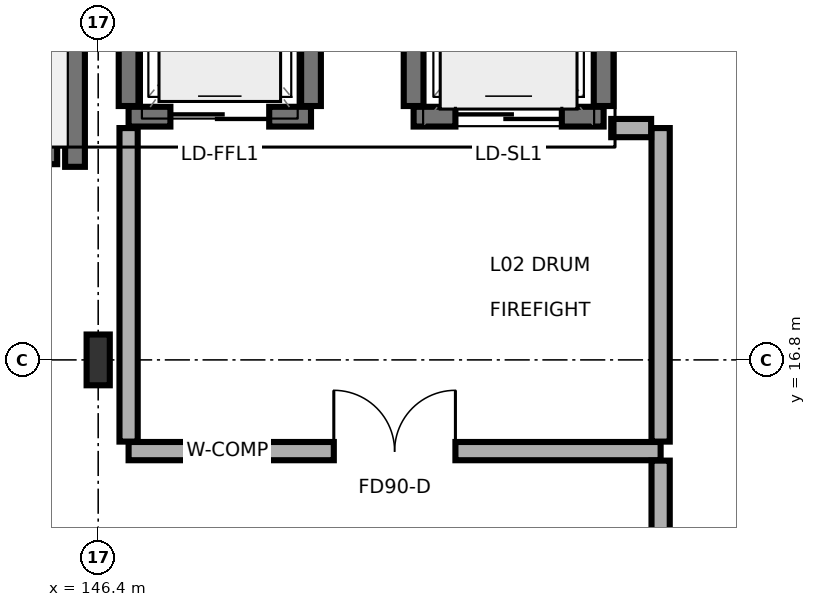
"""IFC4 building model, lengths in metres.
Left out: names, types, materials, properties, quantities, classifications, styles, units other than length and angle.
Written with IfcOpenShell. Run it as: python <this file> out.ifc"""

import sys

from ifc_helpers import new_model, si_unit, direction, frame, frame_2d, origin, origin_2d, place, context, subcontext, project, spatial, rectangle, i_section, extrude, element, fill, save


model = new_model("IFC4")
c1 = context("Model", 3, precision=1e-05, world=origin(), true_north=direction((0.0, 1.0)))
c2 = subcontext(c1, "Body", "Model", "MODEL_VIEW")
j1 = project(units=[si_unit("LENGTHUNIT", "METRE"), si_unit("PLANEANGLEUNIT", "RADIAN")], contexts=[c1])
p1 = place(None, origin())
s1 = spatial("IfcSite", under=j1, at=p1, CompositionType="ELEMENT")
p2 = place(p1, origin())
s2 = spatial("IfcBuilding", under=s1, at=p2, CompositionType="ELEMENT")
p3 = place(p2, frame((0.0, 0.0, 5.4)))
s3 = spatial("IfcBuildingStorey", under=s2, at=p3, CompositionType="ELEMENT", Elevation=5.4)
p4 = place(p3, frame((146.4, 16.8, 0.0), z_axis=(0.0, 0.0, 1.0), x_axis=(1.0, 0.0, 0.0)))
e1 = element("IfcColumn", 1, at=p4, inside=s3, PredefinedType="COLUMN", context=c2, shape_type="SweptSolid", body=[
    extrude(i_section(OverallWidth=0.305, OverallDepth=0.668, WebThickness=0.021, FlangeThickness=0.04, FilletRadius=0.027, at=origin_2d()), origin(), (0.0, 0.0, 1.0), 4.5),
])
p5 = place(p3, frame((146.095, 19.34, 0.0), z_axis=(0.0, 0.0, 1.0), x_axis=(0.0, 1.0, 0.0)))
e2 = element("IfcWall", 2, at=p5, inside=s3, PredefinedType="SHEAR", context=c2, shape_type="SweptSolid", body=[
    extrude(rectangle(XDim=4.27, YDim=0.26, at=frame_2d((2.135, 0.0))), origin(), (0.0, 0.0, 1.0), 4.24),
])
p6 = place(p3, frame((137.34, 19.505, 0.0), z_axis=(0.0, 0.0, 1.0), x_axis=(1.0, 0.0, 0.0)))
e3 = element("IfcWall", 3, at=p6, inside=s3, PredefinedType="SHEAR", context=c2, shape_type="SweptSolid", body=[
    extrude(rectangle(XDim=8.52, YDim=0.26, at=frame_2d((4.26, 0.0))), origin(), (0.0, 0.0, 1.0), 4.24),
])
p7 = place(p3, frame((146.8, 20.0, 0.0), z_axis=(0.0, 0.0, 1.0), x_axis=(1.0, 0.0, 0.0)))
e4 = element("IfcWall", 4, at=p7, inside=s3, PredefinedType="SHEAR", context=c2, shape_type="SweptSolid", body=[
    extrude(rectangle(XDim=2.4, YDim=0.26, at=frame_2d((1.2, 0.0))), origin(), (0.0, 0.0, 1.0), 4.24),
])
p8 = place(p7, frame((0.55, 0.0, 0.0)))
e5 = element("IfcOpeningElement", 5, at=p8, cuts=e4, PredefinedType="OPENING", context=c2, shape_type="SweptSolid", body=[
    extrude(rectangle(XDim=1.3, YDim=2.25, at=frame_2d((0.65, 1.125))), frame((0.0, 0.14, 0.0), z_axis=(0.0, -1.0, 0.0), x_axis=(1.0, 0.0, 0.0)), (0.0, 0.0, 1.0), 0.28),
])
for number, where, z_axis, x_axis in (
    (6, (146.8, 20.14, 0.0), (0.0, 0.0, 1.0), (0.0, 1.0, 0.0)),
    (7, (149.2, 20.14, 0.0), (0.0, 0.0, 1.0), (0.0, 1.0, 0.0)),
):
    element("IfcWall", number, at=place(p3, frame(where, z_axis=z_axis, x_axis=x_axis)), inside=s3, PredefinedType="SHEAR", context=c2, shape_type="SweptSolid", body=[
        extrude(rectangle(XDim=2.52, YDim=0.26, at=frame_2d((1.26, 0.0))), origin(), (0.0, 0.0, 1.0), 4.24),
    ])
p9 = place(p3, frame((150.55, 20.0, 0.0), z_axis=(0.0, 0.0, 1.0), x_axis=(1.0, 0.0, 0.0)))
e8 = element("IfcWall", 8, at=p9, inside=s3, PredefinedType="SHEAR", context=c2, shape_type="SweptSolid", body=[
    extrude(rectangle(XDim=2.5, YDim=0.26, at=frame_2d((1.25, 0.0))), origin(), (0.0, 0.0, 1.0), 4.24),
])
p10 = place(p9, frame((0.55, 0.0, 0.0)))
e9 = element("IfcOpeningElement", 9, at=p10, cuts=e8, PredefinedType="OPENING", context=c2, shape_type="SweptSolid", body=[
    extrude(rectangle(XDim=1.4, YDim=2.3, at=frame_2d((0.7, 1.15))), frame((0.0, 0.14, 0.0), z_axis=(0.0, -1.0, 0.0), x_axis=(1.0, 0.0, 0.0)), (0.0, 0.0, 1.0), 0.28),
])
for number, where, z_axis, x_axis in (
    (10, (150.55, 20.14, 0.0), (0.0, 0.0, 1.0), (0.0, 1.0, 0.0)),
    (11, (153.05, 20.14, 0.0), (0.0, 0.0, 1.0), (0.0, 1.0, 0.0)),
):
    element("IfcWall", number, at=place(p3, frame(where, z_axis=z_axis, x_axis=x_axis)), inside=s3, PredefinedType="SHEAR", context=c2, shape_type="SweptSolid", body=[
        extrude(rectangle(XDim=2.52, YDim=0.26, at=frame_2d((1.26, 0.0))), origin(), (0.0, 0.0, 1.0), 4.24),
    ])
p11 = place(p3, frame((146.8, 15.6, 0.0), z_axis=(0.0, 0.0, 1.0), x_axis=(1.0, 0.0, 0.0)))
e12 = element("IfcWall", 12, at=p11, inside=s3, PredefinedType="SOLIDWALL", context=c2, shape_type="SweptSolid", body=[
    extrude(rectangle(XDim=7.0, YDim=0.24, at=frame_2d((3.5, 0.0))), origin(), (0.0, 0.0, 1.0), 4.24),
])
p12 = place(p11, frame((2.7, 0.0, 0.0)))
e13 = element("IfcOpeningElement", 13, at=p12, cuts=e12, PredefinedType="OPENING", context=c2, shape_type="SweptSolid", body=[
    extrude(rectangle(XDim=1.6, YDim=2.2, at=frame_2d((0.8, 1.1))), frame((0.0, 0.13, 0.0), z_axis=(0.0, -1.0, 0.0), x_axis=(1.0, 0.0, 0.0)), (0.0, 0.0, 1.0), 0.26),
])
for number, where, z_axis, x_axis in (
    (14, (146.8, 15.725, 0.0), (0.0, 0.0, 1.0), (0.0, 1.0, 0.0)),
    (15, (153.8, 15.725, 0.0), (0.0, 0.0, 1.0), (0.0, 1.0, 0.0)),
):
    element("IfcWall", number, at=place(p3, frame(where, z_axis=z_axis, x_axis=x_axis)), inside=s3, PredefinedType="SOLIDWALL", context=c2, shape_type="SweptSolid", body=[
        extrude(rectangle(XDim=4.125, YDim=0.24, at=frame_2d((2.062, 0.0))), origin(), (0.0, 0.0, 1.0), 3.685),
    ])
p13 = place(p3, frame((153.15, 19.85, 0.0), z_axis=(0.0, 0.0, 1.0), x_axis=(1.0, 0.0, 0.0)))
e16 = element("IfcWall", 16, at=p13, inside=s3, PredefinedType="SOLIDWALL", context=c2, shape_type="SweptSolid", body=[
    extrude(rectangle(XDim=0.525, YDim=0.24, at=frame_2d((0.263, 0.0))), origin(), (0.0, 0.0, 1.0), 4.24),
])
p14 = place(p3, frame((153.8, 13.525, 0.0), z_axis=(0.0, 0.0, 1.0), x_axis=(0.0, 1.0, 0.0)))
e17 = element("IfcWall", 17, at=p14, inside=s3, PredefinedType="SOLIDWALL", context=c2, shape_type="SweptSolid", body=[
    extrude(rectangle(XDim=1.95, YDim=0.24, at=frame_2d((0.975, 0.0))), origin(), (0.0, 0.0, 1.0), 4.24),
])
p15 = place(p8, origin())
e18 = element("IfcDoor", 18, at=p15, inside=s3, OperationType="SLIDING_TO_RIGHT", PredefinedType="DOOR", context=c2, shape_type="SweptSolid", body=[
    extrude(rectangle(XDim=1.3, YDim=2.25, at=frame_2d((0.65, 1.125))), frame((0.0, 0.025, 0.0), z_axis=(0.0, -1.0, 0.0), x_axis=(1.0, 0.0, 0.0)), (0.0, 0.0, 1.0), 0.05),
])
fill(e5, e18)
p16 = place(p10, origin())
e19 = element("IfcDoor", 19, at=p16, inside=s3, OperationType="SLIDING_TO_LEFT", PredefinedType="DOOR", context=c2, shape_type="SweptSolid", body=[
    extrude(rectangle(XDim=1.4, YDim=2.3, at=frame_2d((0.7, 1.15))), frame((0.0, 0.025, 0.0), z_axis=(0.0, -1.0, 0.0), x_axis=(1.0, 0.0, 0.0)), (0.0, 0.0, 1.0), 0.05),
])
fill(e9, e19)
p17 = place(p12, origin())
e20 = element("IfcDoor", 20, at=p17, inside=s3, OperationType="DOUBLE_DOOR_SINGLE_SWING", PredefinedType="DOOR", context=c2, shape_type="SweptSolid", body=[
    extrude(rectangle(XDim=1.6, YDim=2.2, at=frame_2d((0.8, 1.1))), frame((0.0, 0.025, 0.0), z_axis=(0.0, -1.0, 0.0), x_axis=(1.0, 0.0, 0.0)), (0.0, 0.0, 1.0), 0.05),
])
fill(e13, e20)
save(model, sys.argv[1])
